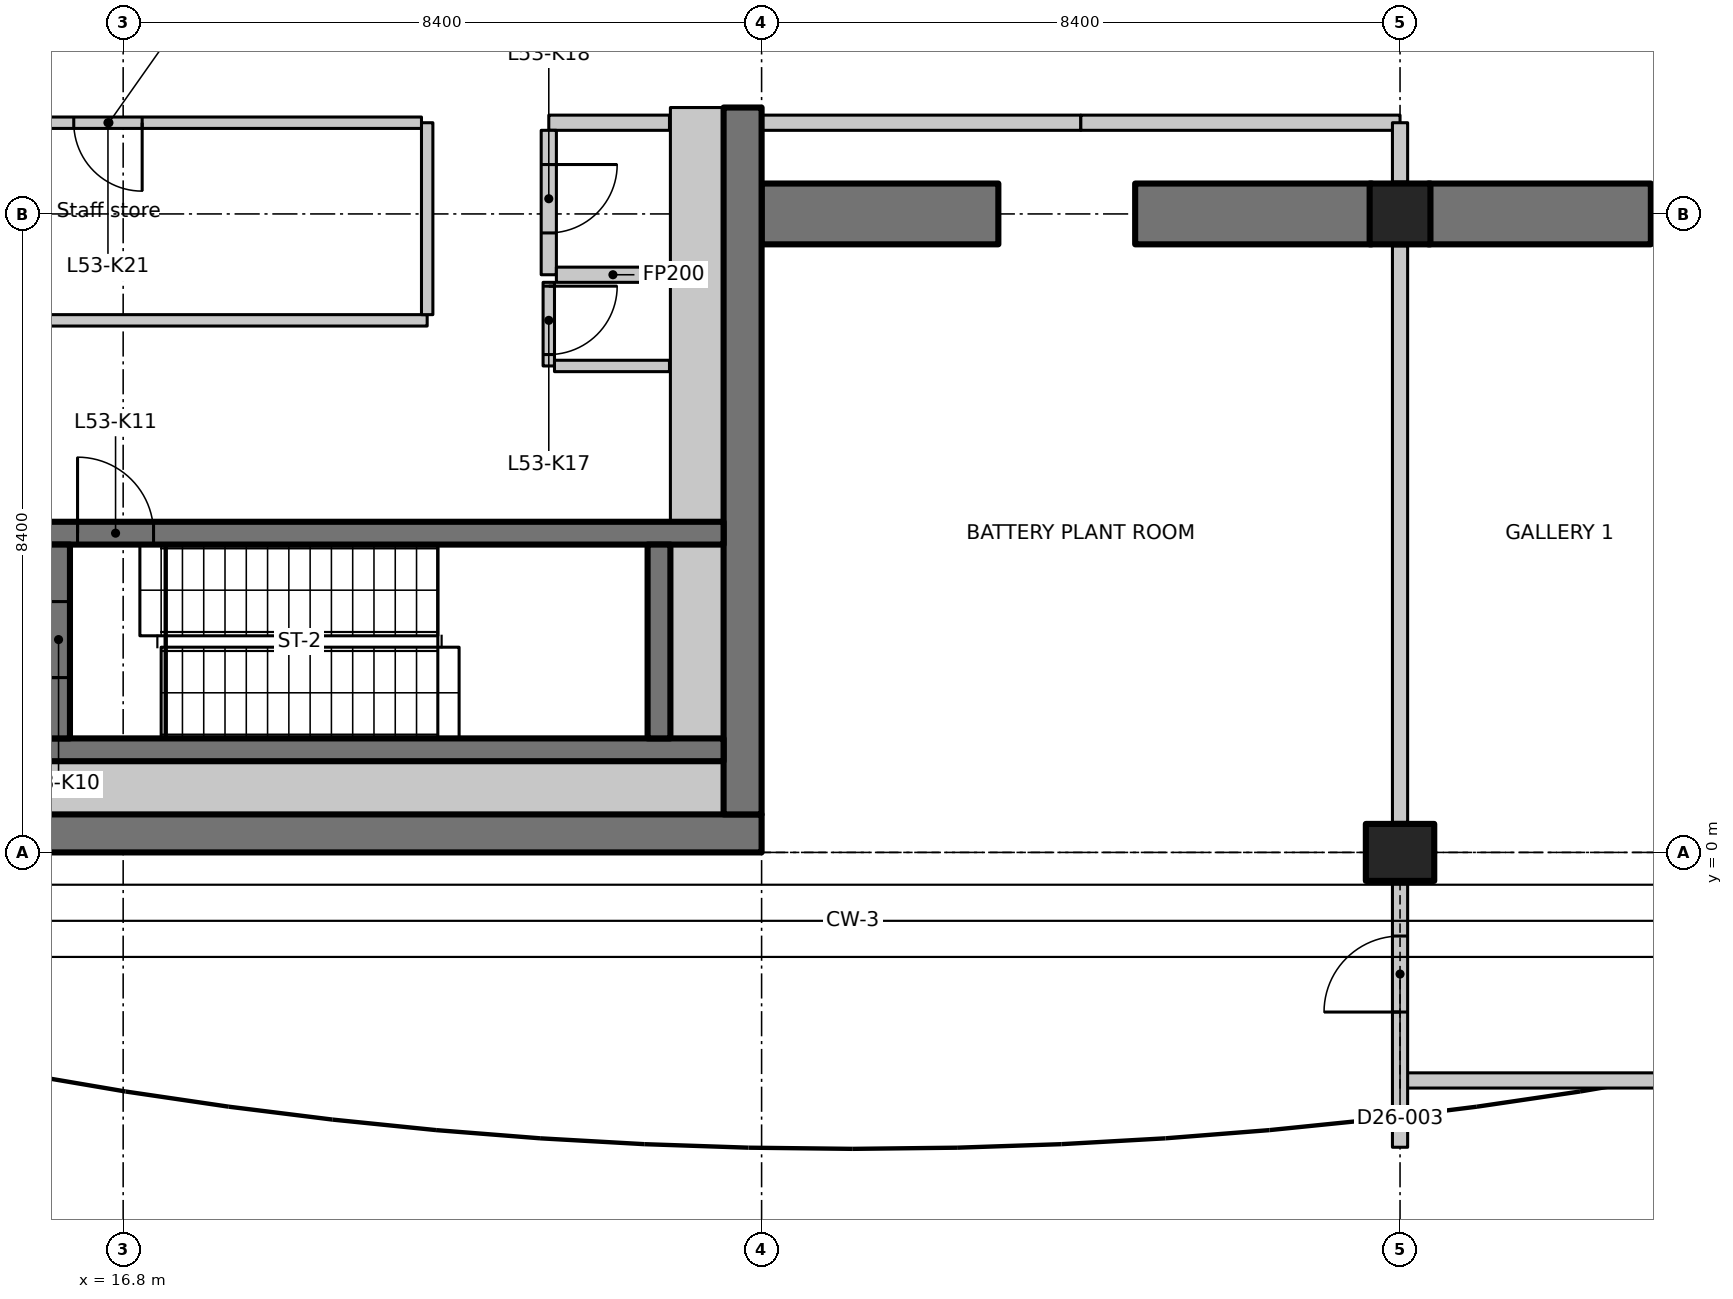
"""IFC4 building model, lengths in metres.
Left out: names, types, materials, properties, quantities, classifications, styles, units other than length and angle.
Written with IfcOpenShell. Run it as: python <this file> out.ifc"""

import sys

from ifc_helpers import new_model, si_unit, direction, frame, frame_2d, origin, origin_2d, place, context, subcontext, project, spatial, polyline, rectangle, outline, extrude, element, fill, save


model = new_model("IFC4")
c1 = context("Model", 3, precision=1e-05, world=origin(), true_north=direction((0.0, 1.0)))
c2 = subcontext(c1, "Body", "Model", "MODEL_VIEW")
j1 = project(units=[si_unit("LENGTHUNIT", "METRE"), si_unit("PLANEANGLEUNIT", "RADIAN")], contexts=[c1])
p1 = place(None, origin())
s1 = spatial("IfcSite", under=j1, at=p1, CompositionType="ELEMENT")
p2 = place(p1, origin())
s2 = spatial("IfcBuilding", under=s1, at=p2, CompositionType="ELEMENT")
p3 = place(p2, frame((0.0, 0.0, 210.9)))
s3 = spatial("IfcBuildingStorey", under=s2, at=p3, CompositionType="ELEMENT", Elevation=210.9)
p4 = place(p3, frame((33.6, 0.0, 0.0), z_axis=(0.0, 0.0, 1.0), x_axis=(0.0, 1.0, 0.0)))
e1 = element("IfcColumn", 1, at=p4, inside=s3, PredefinedType="COLUMN", context=c2, shape_type="SweptSolid", body=[
    extrude(rectangle(XDim=0.75, YDim=0.9, at=origin_2d()), origin(), (0.0, 0.0, 1.0), 4.55),
])
p5 = place(p3, frame((33.6, 8.4, 0.0), z_axis=(0.0, 0.0, 1.0), x_axis=(1.0, 0.0, 0.0)))
e2 = element("IfcColumn", 2, at=p5, inside=s3, PredefinedType="COLUMN", context=c2, shape_type="SweptSolid", body=[
    extrude(rectangle(XDim=0.8, YDim=0.8, at=origin_2d()), origin(), (0.0, 0.0, 1.0), 4.55),
])
for number, where, z_axis, x_axis in (
    (3, (25.2, 8.4, 0.0), (0.0, 0.0, 1.0), (1.0, 0.0, 0.0)),
    (4, (30.115, 8.4, 0.0), (0.0, 0.0, 1.0), (1.0, 0.0, 0.0)),
):
    element("IfcWall", number, at=place(p3, frame(where, z_axis=z_axis, x_axis=x_axis)), inside=s3, PredefinedType="SHEAR", context=c2, shape_type="SweptSolid", body=[
        extrude(rectangle(XDim=3.115, YDim=0.8, at=frame_2d((1.558, 0.0))), origin(), (0.0, 0.0, 1.0), 4.55),
    ])
p6 = place(p3, frame((33.97, 8.4, 0.0), z_axis=(0.0, 0.0, 1.0), x_axis=(1.0, 0.0, 0.0)))
e5 = element("IfcWall", 5, at=p6, inside=s3, PredefinedType="SHEAR", context=c2, shape_type="SweptSolid", body=[
    extrude(rectangle(XDim=2.93, YDim=0.8, at=frame_2d((1.465, 0.0))), origin(), (0.0, 0.0, 1.0), 4.55),
])
p7 = place(p3, frame((7.436, 0.25, 0.0), z_axis=(0.0, 0.0, 1.0), x_axis=(1.0, 0.0, 0.0)))
e6 = element("IfcWall", 6, at=p7, inside=s3, PredefinedType="SHEAR", context=c2, shape_type="SweptSolid", body=[
    extrude(rectangle(XDim=17.764, YDim=0.5, at=frame_2d((8.882, 0.0))), origin(), (0.0, 0.0, 1.0), 4.55),
])
p8 = place(p3, frame((24.95, 0.5, 0.0), z_axis=(0.0, 0.0, 1.0), x_axis=(0.0, 1.0, 0.0)))
e7 = element("IfcWall", 7, at=p8, inside=s3, PredefinedType="SHEAR", context=c2, shape_type="SweptSolid", body=[
    extrude(rectangle(XDim=9.3, YDim=0.5, at=frame_2d((4.65, 0.0))), origin(), (0.0, 0.0, 1.0), 4.55),
])
p9 = place(p3, frame((15.8, 1.35, 0.0), z_axis=(0.0, 0.0, 1.0), x_axis=(1.0, 0.0, 0.0)))
e8 = element("IfcWall", 8, at=p9, inside=s3, PredefinedType="SHEAR", context=c2, shape_type="SweptSolid", body=[
    extrude(rectangle(XDim=8.9, YDim=0.3, at=frame_2d((4.45, 0.0))), origin(), (0.0, 0.0, 1.0), 4.55),
])
p10 = place(p3, frame((15.8, 4.2, 0.0), z_axis=(0.0, 0.0, 1.0), x_axis=(1.0, 0.0, 0.0)))
e9 = element("IfcWall", 9, at=p10, inside=s3, PredefinedType="SHEAR", context=c2, shape_type="SweptSolid", body=[
    extrude(rectangle(XDim=8.9, YDim=0.3, at=frame_2d((4.45, 0.0))), origin(), (0.0, 0.0, 1.0), 4.55),
])
p11 = place(p10, frame((0.4, 0.0, 0.0)))
e10 = element("IfcOpeningElement", 10, at=p11, cuts=e9, PredefinedType="OPENING", context=c2, shape_type="SweptSolid", body=[
    extrude(rectangle(XDim=1.0, YDim=2.1, at=frame_2d((0.5, 1.05))), frame((0.0, 0.16, 0.0), z_axis=(0.0, -1.0, 0.0), x_axis=(1.0, 0.0, 0.0)), (0.0, 0.0, 1.0), 0.32),
])
p12 = place(p3, frame((15.95, 1.5, 0.0), z_axis=(0.0, 0.0, 1.0), x_axis=(0.0, 1.0, 0.0)))
e11 = element("IfcWall", 11, at=p12, inside=s3, PredefinedType="SHEAR", context=c2, shape_type="SweptSolid", body=[
    extrude(rectangle(XDim=2.55, YDim=0.3, at=frame_2d((1.275, 0.0))), origin(), (0.0, 0.0, 1.0), 4.55),
])
p13 = place(p12, frame((0.8, 0.0, 0.0)))
e12 = element("IfcOpeningElement", 12, at=p13, cuts=e11, PredefinedType="OPENING", context=c2, shape_type="SweptSolid", body=[
    extrude(rectangle(XDim=1.0, YDim=2.1, at=frame_2d((0.5, 1.05))), frame((0.0, 0.16, 0.0), z_axis=(0.0, -1.0, 0.0), x_axis=(1.0, 0.0, 0.0)), (0.0, 0.0, 1.0), 0.32),
])
p14 = place(p3, frame((23.85, 1.5, 0.0), z_axis=(0.0, 0.0, 1.0), x_axis=(0.0, 1.0, 0.0)))
e13 = element("IfcWall", 13, at=p14, inside=s3, PredefinedType="SHEAR", context=c2, shape_type="SweptSolid", body=[
    extrude(rectangle(XDim=2.55, YDim=0.3, at=frame_2d((1.275, 0.0))), origin(), (0.0, 0.0, 1.0), 4.55),
])
p15 = place(p3, frame((23.988, 9.6, 0.0), z_axis=(0.0, 0.0, 1.0), x_axis=(-1.0, 0.0, 0.0)))
e14 = element("IfcWall", 14, at=p15, inside=s3, PredefinedType="PARTITIONING", context=c2, shape_type="SweptSolid", body=[
    extrude(rectangle(XDim=1.588, YDim=0.2, at=frame_2d((0.794, 0.0))), origin(), (0.0, 0.0, 1.0), 4.55),
])
p16 = place(p3, frame((22.4, 9.5, 0.0), z_axis=(0.0, 0.0, 1.0), x_axis=(0.0, -1.0, 0.0)))
e15 = element("IfcWall", 15, at=p16, inside=s3, PredefinedType="PARTITIONING", context=c2, shape_type="SweptSolid", body=[
    extrude(rectangle(XDim=1.9, YDim=0.2, at=frame_2d((0.95, 0.0))), origin(), (0.0, 0.0, 1.0), 4.55),
])
p17 = place(p16, frame((0.45, 0.0, 0.0)))
e16 = element("IfcOpeningElement", 16, at=p17, cuts=e15, PredefinedType="OPENING", context=c2, shape_type="SweptSolid", body=[
    extrude(rectangle(XDim=0.9, YDim=2.1, at=frame_2d((0.45, 1.05))), frame((0.0, 0.11, 0.0), z_axis=(0.0, -1.0, 0.0), x_axis=(1.0, 0.0, 0.0)), (0.0, 0.0, 1.0), 0.22),
])
p18 = place(p3, frame((22.5, 7.6, 0.0), z_axis=(0.0, 0.0, 1.0), x_axis=(1.0, 0.0, 0.0)))
e17 = element("IfcWall", 17, at=p18, inside=s3, PredefinedType="PARTITIONING", context=c2, shape_type="SweptSolid", body=[
    extrude(rectangle(XDim=1.488, YDim=0.2, at=frame_2d((0.744, 0.0))), origin(), (0.0, 0.0, 1.0), 4.55),
])
p19 = place(p3, frame((12.5, 7.0, 0.0), z_axis=(0.0, 0.0, 1.0), x_axis=(1.0, 0.0, 0.0)))
e18 = element("IfcWall", 18, at=p19, inside=s3, PredefinedType="PARTITIONING", context=c2, shape_type="SweptSolid", body=[
    extrude(rectangle(XDim=8.3, YDim=0.15, at=frame_2d((4.15, 0.0))), origin(), (0.0, 0.0, 1.0), 4.55),
])
p20 = place(p3, frame((20.8, 7.075, 0.0), z_axis=(0.0, 0.0, 1.0), x_axis=(0.0, 1.0, 0.0)))
e19 = element("IfcWall", 19, at=p20, inside=s3, PredefinedType="PARTITIONING", context=c2, shape_type="SweptSolid", body=[
    extrude(rectangle(XDim=2.525, YDim=0.15, at=frame_2d((1.263, 0.0))), origin(), (0.0, 0.0, 1.0), 4.55),
])
p21 = place(p3, frame((20.725, 9.6, 0.0), z_axis=(0.0, 0.0, 1.0), x_axis=(-1.0, 0.0, 0.0)))
e20 = element("IfcWall", 20, at=p21, inside=s3, PredefinedType="PARTITIONING", context=c2, shape_type="SweptSolid", body=[
    extrude(rectangle(XDim=8.225, YDim=0.15, at=frame_2d((4.113, 0.0))), origin(), (0.0, 0.0, 1.0), 4.55),
])
p22 = place(p21, frame((3.675, 0.0, 0.0)))
e21 = element("IfcOpeningElement", 21, at=p22, cuts=e20, PredefinedType="OPENING", context=c2, shape_type="SweptSolid", body=[
    extrude(rectangle(XDim=0.9, YDim=2.1, at=frame_2d((0.45, 1.05))), frame((0.0, 0.085, 0.0), z_axis=(0.0, -1.0, 0.0), x_axis=(1.0, 0.0, 0.0)), (0.0, 0.0, 1.0), 0.17),
])
p23 = place(p3, frame((22.4, 7.5, 0.0), z_axis=(0.0, 0.0, 1.0), x_axis=(0.0, -1.0, 0.0)))
e22 = element("IfcWall", 22, at=p23, inside=s3, PredefinedType="PARTITIONING", context=c2, shape_type="SweptSolid", body=[
    extrude(rectangle(XDim=1.1, YDim=0.15, at=frame_2d((0.55, 0.0))), origin(), (0.0, 0.0, 1.0), 4.55),
])
p24 = place(p23, frame((0.05, 0.0, 0.0)))
e23 = element("IfcOpeningElement", 23, at=p24, cuts=e22, PredefinedType="OPENING", context=c2, shape_type="SweptSolid", body=[
    extrude(rectangle(XDim=0.9, YDim=2.1, at=frame_2d((0.45, 1.05))), frame((0.0, 0.085, 0.0), z_axis=(0.0, -1.0, 0.0), x_axis=(1.0, 0.0, 0.0)), (0.0, 0.0, 1.0), 0.17),
])
p25 = place(p3, frame((22.475, 6.4, 0.0), z_axis=(0.0, 0.0, 1.0), x_axis=(1.0, 0.0, 0.0)))
e24 = element("IfcWall", 24, at=p25, inside=s3, PredefinedType="PARTITIONING", context=c2, shape_type="SweptSolid", body=[
    extrude(rectangle(XDim=1.513, YDim=0.15, at=frame_2d((0.756, 0.0))), origin(), (0.0, 0.0, 1.0), 4.55),
])
p26 = place(p3, frame((13.35, 0.85, 0.0), z_axis=(0.0, 0.0, 1.0), x_axis=(1.0, 0.0, 0.0)))
e25 = element("IfcWall", 25, at=p26, inside=s3, PredefinedType="PARTITIONING", context=c2, shape_type="SweptSolid", body=[
    extrude(rectangle(XDim=11.35, YDim=0.7, at=frame_2d((5.675, 0.0))), origin(), (0.0, 0.0, 1.0), 4.55),
])
p27 = place(p3, frame((24.35, 1.5, 0.0), z_axis=(0.0, 0.0, 1.0), x_axis=(0.0, 1.0, 0.0)))
e26 = element("IfcWall", 26, at=p27, inside=s3, PredefinedType="PARTITIONING", context=c2, shape_type="SweptSolid", body=[
    extrude(rectangle(XDim=2.55, YDim=0.7, at=frame_2d((1.275, 0.0))), origin(), (0.0, 0.0, 1.0), 4.55),
])
p28 = place(p3, frame((24.35, 4.35, 0.0), z_axis=(0.0, 0.0, 1.0), x_axis=(0.0, 1.0, 0.0)))
e27 = element("IfcWall", 27, at=p28, inside=s3, PredefinedType="PARTITIONING", context=c2, shape_type="SweptSolid", body=[
    extrude(rectangle(XDim=5.45, YDim=0.7, at=frame_2d((2.725, 0.0))), origin(), (0.0, 0.0, 1.0), 4.55),
])
p29 = place(p3, frame((29.4, 9.6, 0.0), z_axis=(0.0, 0.0, 1.0), x_axis=(-1.0, 0.0, 0.0)))
e28 = element("IfcWall", 28, at=p29, inside=s3, PredefinedType="PARTITIONING", context=c2, shape_type="SweptSolid", body=[
    extrude(rectangle(XDim=4.2, YDim=0.2, at=frame_2d((2.1, 0.0))), origin(), (0.0, 0.0, 1.0), 4.53),
])
p30 = place(p3, frame((33.6, 9.6, 0.0), z_axis=(0.0, 0.0, 1.0), x_axis=(-1.0, 0.0, 0.0)))
e29 = element("IfcWall", 29, at=p30, inside=s3, PredefinedType="PARTITIONING", context=c2, shape_type="SweptSolid", body=[
    extrude(rectangle(XDim=4.2, YDim=0.2, at=frame_2d((2.1, 0.0))), origin(), (0.0, 0.0, 1.0), 4.53),
])
p31 = place(p3, frame((37.587, -3.0, 0.0), z_axis=(0.0, 0.0, 1.0), x_axis=(-1.0, 0.0, 0.0)))
e30 = element("IfcWall", 30, at=p31, inside=s3, PredefinedType="PARTITIONING", context=c2, shape_type="SweptSolid", body=[
    extrude(rectangle(XDim=3.987, YDim=0.2, at=frame_2d((1.993, 0.0))), origin(), (0.0, 0.0, 1.0), 4.18),
])
p32 = place(p3, frame((33.6, -3.879, 0.0), z_axis=(0.0, 0.0, 1.0), x_axis=(0.0, 1.0, 0.0)))
e31 = element("IfcWall", 31, at=p32, inside=s3, PredefinedType="PARTITIONING", context=c2, shape_type="SweptSolid", body=[
    extrude(rectangle(XDim=3.484, YDim=0.2, at=frame_2d((1.742, 0.0))), origin(), (0.0, 0.0, 1.0), 4.18),
])
p33 = place(p32, frame((1.779, 0.0, 0.0)))
e32 = element("IfcOpeningElement", 32, at=p33, cuts=e31, PredefinedType="OPENING", context=c2, shape_type="SweptSolid", body=[
    extrude(rectangle(XDim=1.0, YDim=2.1, at=frame_2d((0.5, 1.05))), frame((0.0, 0.11, 0.0), z_axis=(0.0, -1.0, 0.0), x_axis=(1.0, 0.0, 0.0)), (0.0, 0.0, 1.0), 0.22),
])
p34 = place(p3, frame((33.6, 0.395, 0.0), z_axis=(0.0, 0.0, 1.0), x_axis=(0.0, 1.0, 0.0)))
e33 = element("IfcWall", 33, at=p34, inside=s3, PredefinedType="PARTITIONING", context=c2, shape_type="SweptSolid", body=[
    extrude(outline(polyline([(0.0, 0.0), (7.585, 0.0), (7.585, 4.53), (0.055, 4.53), (0.053, 4.18), (0.0, 4.18), (0.0, 0.0)])), frame((0.0, 0.1, 0.0), z_axis=(0.0, -1.0, 0.0), x_axis=(1.0, 0.0, 0.0)), (0.0, 0.0, 1.0), 0.2),
])
p35 = place(p3, frame((33.6, 8.82, 0.0), z_axis=(0.0, 0.0, 1.0), x_axis=(0.0, 1.0, 0.0)))
e34 = element("IfcWall", 34, at=p35, inside=s3, PredefinedType="PARTITIONING", context=c2, shape_type="SweptSolid", body=[
    extrude(rectangle(XDim=0.78, YDim=0.2, at=frame_2d((0.39, 0.0))), origin(), (0.0, 0.0, 1.0), 4.53),
])
p36 = place(p13, origin())
e35 = element("IfcDoor", 35, at=p36, inside=s3, OperationType="SINGLE_SWING_RIGHT", PredefinedType="DOOR", context=c2, shape_type="SweptSolid", body=[
    extrude(rectangle(XDim=1.0, YDim=2.1, at=frame_2d((0.5, 1.05))), frame((0.0, 0.025, 0.0), z_axis=(0.0, -1.0, 0.0), x_axis=(1.0, 0.0, 0.0)), (0.0, 0.0, 1.0), 0.05),
])
fill(e12, e35)
p37 = place(p11, origin())
e36 = element("IfcDoor", 36, at=p37, inside=s3, OperationType="SINGLE_SWING_LEFT", PredefinedType="DOOR", context=c2, shape_type="SweptSolid", body=[
    extrude(rectangle(XDim=1.0, YDim=2.1, at=frame_2d((0.5, 1.05))), frame((0.0, 0.025, 0.0), z_axis=(0.0, -1.0, 0.0), x_axis=(1.0, 0.0, 0.0)), (0.0, 0.0, 1.0), 0.05),
])
fill(e10, e36)
p38 = place(p24, origin())
e37 = element("IfcDoor", 37, at=p38, inside=s3, OperationType="SINGLE_SWING_LEFT", PredefinedType="DOOR", context=c2, shape_type="SweptSolid", body=[
    extrude(rectangle(XDim=0.9, YDim=2.1, at=frame_2d((0.45, 1.05))), frame((0.0, 0.025, 0.0), z_axis=(0.0, -1.0, 0.0), x_axis=(1.0, 0.0, 0.0)), (0.0, 0.0, 1.0), 0.05),
])
fill(e23, e37)
p39 = place(p17, origin())
e38 = element("IfcDoor", 38, at=p39, inside=s3, OperationType="SINGLE_SWING_RIGHT", PredefinedType="DOOR", context=c2, shape_type="SweptSolid", body=[
    extrude(rectangle(XDim=0.9, YDim=2.1, at=frame_2d((0.45, 1.05))), frame((0.0, 0.025, 0.0), z_axis=(0.0, -1.0, 0.0), x_axis=(1.0, 0.0, 0.0)), (0.0, 0.0, 1.0), 0.05),
])
fill(e16, e38)
p40 = place(p22, origin())
e39 = element("IfcDoor", 39, at=p40, inside=s3, OperationType="SINGLE_SWING_LEFT", PredefinedType="DOOR", context=c2, shape_type="SweptSolid", body=[
    extrude(rectangle(XDim=0.9, YDim=2.1, at=frame_2d((0.45, 1.05))), frame((0.0, 0.025, 0.0), z_axis=(0.0, -1.0, 0.0), x_axis=(1.0, 0.0, 0.0)), (0.0, 0.0, 1.0), 0.05),
])
fill(e21, e39)
p41 = place(p33, origin())
e40 = element("IfcDoor", 40, at=p41, inside=s3, OperationType="SINGLE_SWING_LEFT", PredefinedType="DOOR", context=c2, shape_type="SweptSolid", body=[
    extrude(rectangle(XDim=1.0, YDim=2.1, at=frame_2d((0.5, 1.05))), frame((0.0, 0.025, 0.0), z_axis=(0.0, -1.0, 0.0), x_axis=(1.0, 0.0, 0.0)), (0.0, 0.0, 1.0), 0.05),
])
fill(e32, e40)
save(model, sys.argv[1])
